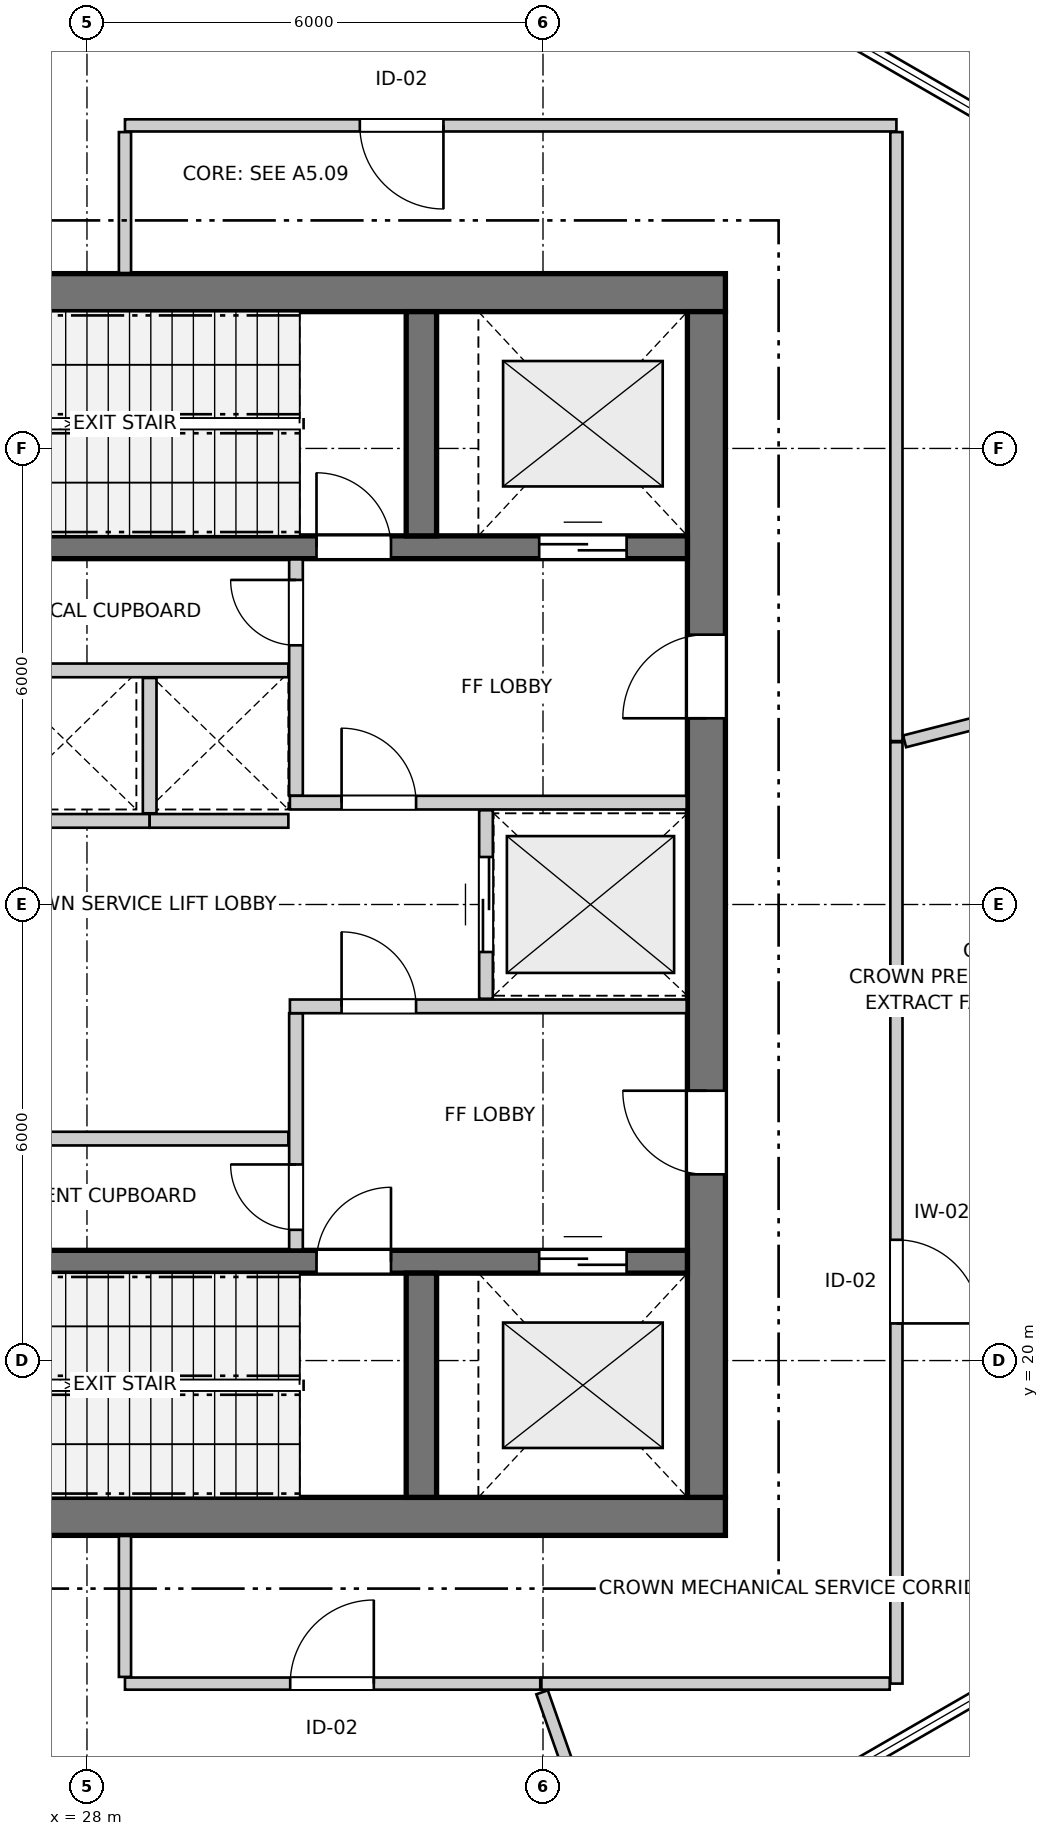
"""IFC4 building model, lengths in metres.
Left out: names, types, materials, properties, quantities, classifications, styles, units other than length and angle.
Written with IfcOpenShell. Run it as: python <this file> out.ifc"""

import sys

from ifc_helpers import new_model, si_unit, direction, frame, frame_2d, origin, place, context, subcontext, project, spatial, rectangle, extrude, source, transform, mapped, element, fill, save


model = new_model("IFC4")
c1 = context("Model", 3, precision=1e-05, world=origin(), true_north=direction((0.0, 1.0)))
c2 = subcontext(c1, "Body", "Model", "MODEL_VIEW")
j1 = project(units=[si_unit("LENGTHUNIT", "METRE"), si_unit("PLANEANGLEUNIT", "RADIAN")], contexts=[c1])
p1 = place(None, origin())
s1 = spatial("IfcSite", under=j1, at=p1, CompositionType="ELEMENT")
p2 = place(p1, origin())
s2 = spatial("IfcBuilding", under=s1, at=p2, CompositionType="ELEMENT")
p3 = place(p2, frame((0.0, 0.0, 253.2)))
s3 = spatial("IfcBuildingStorey", under=s2, at=p3, CompositionType="ELEMENT", Elevation=253.2)
for number, where, z_axis, x_axis in (
    (1, (24.3, 17.95, 0.0), (0.0, 0.0, 1.0), (1.0, 0.0, 0.0)),
    (2, (36.4, 34.05, 0.0), (0.0, 0.0, 1.0), (-1.0, 0.0, 0.0)),
):
    element("IfcWall", number, at=place(p3, frame(where, z_axis=z_axis, x_axis=x_axis)), inside=s3, PredefinedType="SHEAR", context=c2, shape_type="SweptSolid", body=[
        extrude(rectangle(XDim=12.1, YDim=0.5, at=frame_2d((6.05, 0.0))), origin(), (0.0, 0.0, 1.0), 4.05),
    ])
p4 = place(p3, frame((36.15, 18.2, 0.0), z_axis=(0.0, 0.0, 1.0), x_axis=(0.0, 1.0, 0.0)))
e3 = element("IfcWall", 3, at=p4, inside=s3, PredefinedType="SHEAR", context=c2, shape_type="SweptSolid", body=[
    extrude(rectangle(XDim=15.6, YDim=0.5, at=frame_2d((7.8, 0.0))), origin(), (0.0, 0.0, 1.0), 4.05),
])
p5 = place(p4, frame((4.25, 0.0, 0.0)))
e4 = element("IfcOpeningElement", 4, at=p5, cuts=e3, PredefinedType="OPENING", context=c2, shape_type="SweptSolid", body=[
    extrude(rectangle(XDim=1.1, YDim=2.15, at=frame_2d((0.55, 1.075))), frame((0.0, 0.26, 0.0), z_axis=(0.0, -1.0, 0.0), x_axis=(1.0, 0.0, 0.0)), (0.0, 0.0, 1.0), 0.52),
])
p6 = place(p4, frame((10.25, 0.0, 0.0)))
e5 = element("IfcOpeningElement", 5, at=p6, cuts=e3, PredefinedType="OPENING", context=c2, shape_type="SweptSolid", body=[
    extrude(rectangle(XDim=1.1, YDim=2.15, at=frame_2d((0.55, 1.075))), frame((0.0, 0.26, 0.0), z_axis=(0.0, -1.0, 0.0), x_axis=(1.0, 0.0, 0.0)), (0.0, 0.0, 1.0), 0.52),
])
p7 = place(p3, frame((24.8, 21.3, 0.0), z_axis=(0.0, 0.0, 1.0), x_axis=(1.0, 0.0, 0.0)))
e6 = element("IfcWall", 6, at=p7, inside=s3, PredefinedType="SHEAR", context=c2, shape_type="SweptSolid", body=[
    extrude(rectangle(XDim=11.1, YDim=0.3, at=frame_2d((5.55, 0.0))), origin(), (0.0, 0.0, 1.0), 4.05),
])
p8 = place(p7, frame((6.22, 0.0, 0.0)))
e7 = element("IfcOpeningElement", 7, at=p8, cuts=e6, PredefinedType="OPENING", context=c2, shape_type="SweptSolid", body=[
    extrude(rectangle(XDim=0.98, YDim=2.15, at=frame_2d((0.49, 1.075))), frame((0.0, 0.16, 0.0), z_axis=(0.0, -1.0, 0.0), x_axis=(1.0, 0.0, 0.0)), (0.0, 0.0, 1.0), 0.32),
])
p9 = place(p7, frame((9.15, 0.0, 0.0)))
e8 = element("IfcOpeningElement", 8, at=p9, cuts=e6, PredefinedType="OPENING", context=c2, shape_type="SweptSolid", body=[
    extrude(rectangle(XDim=1.15, YDim=2.15, at=frame_2d((0.575, 1.075))), frame((0.0, 0.16, 0.0), z_axis=(0.0, -1.0, 0.0), x_axis=(1.0, 0.0, 0.0)), (0.0, 0.0, 1.0), 0.32),
])
p10 = place(p3, frame((32.4, 18.2, 0.0), z_axis=(0.0, 0.0, 1.0), x_axis=(0.0, 1.0, 0.0)))
e9 = element("IfcWall", 9, at=p10, inside=s3, PredefinedType="SHEAR", context=c2, shape_type="SweptSolid", body=[
    extrude(rectangle(XDim=2.95, YDim=0.4, at=frame_2d((1.475, 0.0))), origin(), (0.0, 0.0, 1.0), 4.05),
])
p11 = place(p3, frame((24.8, 30.7, 0.0), z_axis=(0.0, 0.0, 1.0), x_axis=(1.0, 0.0, 0.0)))
e10 = element("IfcWall", 10, at=p11, inside=s3, PredefinedType="SHEAR", context=c2, shape_type="SweptSolid", body=[
    extrude(rectangle(XDim=11.1, YDim=0.3, at=frame_2d((5.55, 0.0))), origin(), (0.0, 0.0, 1.0), 4.05),
])
p12 = place(p11, frame((6.22, 0.0, 0.0)))
e11 = element("IfcOpeningElement", 11, at=p12, cuts=e10, PredefinedType="OPENING", context=c2, shape_type="SweptSolid", body=[
    extrude(rectangle(XDim=0.98, YDim=2.15, at=frame_2d((0.49, 1.075))), frame((0.0, 0.16, 0.0), z_axis=(0.0, -1.0, 0.0), x_axis=(1.0, 0.0, 0.0)), (0.0, 0.0, 1.0), 0.32),
])
p13 = place(p11, frame((9.15, 0.0, 0.0)))
e12 = element("IfcOpeningElement", 12, at=p13, cuts=e10, PredefinedType="OPENING", context=c2, shape_type="SweptSolid", body=[
    extrude(rectangle(XDim=1.15, YDim=2.15, at=frame_2d((0.575, 1.075))), frame((0.0, 0.16, 0.0), z_axis=(0.0, -1.0, 0.0), x_axis=(1.0, 0.0, 0.0)), (0.0, 0.0, 1.0), 0.32),
])
p14 = place(p3, frame((32.4, 30.85, 0.0), z_axis=(0.0, 0.0, 1.0), x_axis=(0.0, 1.0, 0.0)))
e13 = element("IfcWall", 13, at=p14, inside=s3, PredefinedType="SHEAR", context=c2, shape_type="SweptSolid", body=[
    extrude(rectangle(XDim=2.95, YDim=0.4, at=frame_2d((1.475, 0.0))), origin(), (0.0, 0.0, 1.0), 4.05),
])
p15 = place(p3, frame((30.75, 21.46, 0.0), z_axis=(0.0, 0.0, 1.0), x_axis=(0.0, 1.0, 0.0)))
e14 = element("IfcWall", 14, at=p15, inside=s3, PredefinedType="PARTITIONING", context=c2, shape_type="SweptSolid", body=[
    extrude(rectangle(XDim=3.11, YDim=0.18, at=frame_2d((1.555, 0.0))), origin(), (0.0, 0.0, 1.0), 4.05),
])
p16 = place(p15, frame((0.26, 0.0, 0.0)))
e15 = element("IfcOpeningElement", 15, at=p16, cuts=e14, PredefinedType="OPENING", context=c2, shape_type="SweptSolid", body=[
    extrude(rectangle(XDim=0.86, YDim=2.05, at=frame_2d((0.43, 1.025))), frame((0.0, 0.1, 0.0), z_axis=(0.0, -1.0, 0.0), x_axis=(1.0, 0.0, 0.0)), (0.0, 0.0, 1.0), 0.2),
])
p17 = place(p3, frame((30.67, 24.66, 0.0), z_axis=(0.0, 0.0, 1.0), x_axis=(1.0, 0.0, 0.0)))
e16 = element("IfcWall", 16, at=p17, inside=s3, PredefinedType="PARTITIONING", context=c2, shape_type="SweptSolid", body=[
    extrude(rectangle(XDim=5.22, YDim=0.18, at=frame_2d((2.61, 0.0))), origin(), (0.0, 0.0, 1.0), 4.05),
])
p18 = place(p17, frame((0.68, 0.0, 0.0)))
e17 = element("IfcOpeningElement", 17, at=p18, cuts=e16, PredefinedType="OPENING", context=c2, shape_type="SweptSolid", body=[
    extrude(rectangle(XDim=0.98, YDim=2.15, at=frame_2d((0.49, 1.075))), frame((0.0, 0.1, 0.0), z_axis=(0.0, -1.0, 0.0), x_axis=(1.0, 0.0, 0.0)), (0.0, 0.0, 1.0), 0.2),
])
p19 = place(p3, frame((30.75, 27.43, 0.0), z_axis=(0.0, 0.0, 1.0), x_axis=(0.0, 1.0, 0.0)))
e18 = element("IfcWall", 18, at=p19, inside=s3, PredefinedType="PARTITIONING", context=c2, shape_type="SweptSolid", body=[
    extrude(rectangle(XDim=3.11, YDim=0.18, at=frame_2d((1.555, 0.0))), origin(), (0.0, 0.0, 1.0), 4.05),
])
p20 = place(p19, frame((1.98, 0.0, 0.0)))
e19 = element("IfcOpeningElement", 19, at=p20, cuts=e18, PredefinedType="OPENING", context=c2, shape_type="SweptSolid", body=[
    extrude(rectangle(XDim=0.86, YDim=2.05, at=frame_2d((0.43, 1.025))), frame((0.0, 0.1, 0.0), z_axis=(0.0, -1.0, 0.0), x_axis=(1.0, 0.0, 0.0)), (0.0, 0.0, 1.0), 0.2),
])
p21 = place(p3, frame((30.67, 27.34, 0.0), z_axis=(0.0, 0.0, 1.0), x_axis=(1.0, 0.0, 0.0)))
e20 = element("IfcWall", 20, at=p21, inside=s3, PredefinedType="PARTITIONING", context=c2, shape_type="SweptSolid", body=[
    extrude(rectangle(XDim=5.22, YDim=0.18, at=frame_2d((2.61, 0.0))), origin(), (0.0, 0.0, 1.0), 4.05),
])
p22 = place(p21, frame((0.68, 0.0, 0.0)))
e21 = element("IfcOpeningElement", 21, at=p22, cuts=e20, PredefinedType="OPENING", context=c2, shape_type="SweptSolid", body=[
    extrude(rectangle(XDim=0.98, YDim=2.15, at=frame_2d((0.49, 1.075))), frame((0.0, 0.1, 0.0), z_axis=(0.0, -1.0, 0.0), x_axis=(1.0, 0.0, 0.0)), (0.0, 0.0, 1.0), 0.2),
])
p23 = place(p3, frame((33.25, 24.76, 0.0), z_axis=(0.0, 0.0, 1.0), x_axis=(0.0, 1.0, 0.0)))
e22 = element("IfcWall", 22, at=p23, inside=s3, PredefinedType="PARTITIONING", context=c2, shape_type="SweptSolid", body=[
    extrude(rectangle(XDim=2.48, YDim=0.18, at=frame_2d((1.24, 0.0))), origin(), (0.0, 0.0, 1.0), 4.05),
])
p24 = place(p23, frame((0.615, 0.0, 0.0)))
e23 = element("IfcOpeningElement", 23, at=p24, cuts=e22, PredefinedType="OPENING", context=c2, shape_type="SweptSolid", body=[
    extrude(rectangle(XDim=1.25, YDim=2.15, at=frame_2d((0.625, 1.075))), frame((0.0, 0.1, 0.0), z_axis=(0.0, -1.0, 0.0), x_axis=(1.0, 0.0, 0.0)), (0.0, 0.0, 1.0), 0.2),
])
for number, where, z_axis, x_axis in (
    (24, (24.81, 22.92, 0.0), (0.0, 0.0, 1.0), (1.0, 0.0, 0.0)),
    (25, (24.81, 29.08, 0.0), (0.0, 0.0, 1.0), (1.0, 0.0, 0.0)),
):
    element("IfcWall", number, at=place(p3, frame(where, z_axis=z_axis, x_axis=x_axis)), inside=s3, PredefinedType="PARTITIONING", context=c2, shape_type="SweptSolid", body=[
        extrude(rectangle(XDim=5.84, YDim=0.18, at=frame_2d((2.92, 0.0))), origin(), (0.0, 0.0, 1.0), 4.05),
    ])
p25 = place(p3, frame((26.775, 27.1, 0.0), z_axis=(0.0, 0.0, 1.0), x_axis=(1.0, 0.0, 0.0)))
e26 = element("IfcWall", 26, at=p25, inside=s3, PredefinedType="PARTITIONING", context=c2, shape_type="SweptSolid", body=[
    extrude(rectangle(XDim=2.05, YDim=0.18, at=frame_2d((1.025, 0.0))), origin(), (0.0, 0.0, 1.0), 4.05),
])
p26 = place(p3, frame((28.825, 27.1, 0.0), z_axis=(0.0, 0.0, 1.0), x_axis=(1.0, 0.0, 0.0)))
e27 = element("IfcWall", 27, at=p26, inside=s3, PredefinedType="PARTITIONING", context=c2, shape_type="SweptSolid", body=[
    extrude(rectangle(XDim=1.825, YDim=0.18, at=frame_2d((0.913, 0.0))), origin(), (0.0, 0.0, 1.0), 4.05),
])
p27 = place(p3, frame((28.825, 27.2, 0.0), z_axis=(0.0, 0.0, 1.0), x_axis=(0.0, 1.0, 0.0)))
e28 = element("IfcWall", 28, at=p27, inside=s3, PredefinedType="PARTITIONING", context=c2, shape_type="SweptSolid", body=[
    extrude(rectangle(XDim=1.78, YDim=0.18, at=frame_2d((0.89, 0.0))), origin(), (0.0, 0.0, 1.0), 4.05),
])
p28 = place(p3, frame((38.65, 28.135, 0.0), z_axis=(0.0, 0.0, 1.0), x_axis=(0.0, -1.0, 0.0)))
e29 = element("IfcWall", 29, at=p28, inside=s3, PredefinedType="PARTITIONING", context=c2, shape_type="SweptSolid", body=[
    extrude(rectangle(XDim=12.385, YDim=0.16, at=frame_2d((6.192, 0.0))), origin(), (0.0, 0.0, 1.0), 4.05),
])
p29 = place(p28, frame((6.546, 0.0, 0.0)))
e30 = element("IfcOpeningElement", 30, at=p29, cuts=e29, PredefinedType="OPENING", context=c2, shape_type="SweptSolid", body=[
    extrude(rectangle(XDim=1.1, YDim=2.15, at=frame_2d((0.55, 1.075))), frame((0.0, 0.09, 0.0), z_axis=(0.0, -1.0, 0.0), x_axis=(1.0, 0.0, 0.0)), (0.0, 0.0, 1.0), 0.18),
])
p30 = place(p3, frame((38.65, 36.25, 0.0), z_axis=(0.0, 0.0, 1.0), x_axis=(-1.0, 0.0, 0.0)))
e31 = element("IfcWall", 31, at=p30, inside=s3, PredefinedType="PARTITIONING", context=c2, shape_type="SweptSolid", body=[
    extrude(rectangle(XDim=10.15, YDim=0.16, at=frame_2d((5.075, 0.0))), origin(), (0.0, 0.0, 1.0), 4.05),
])
p31 = place(p30, frame((5.96, 0.0, 0.0)))
e32 = element("IfcOpeningElement", 32, at=p31, cuts=e31, PredefinedType="OPENING", context=c2, shape_type="SweptSolid", body=[
    extrude(rectangle(XDim=1.1, YDim=2.15, at=frame_2d((0.55, 1.075))), frame((0.0, 0.09, 0.0), z_axis=(0.0, -1.0, 0.0), x_axis=(1.0, 0.0, 0.0)), (0.0, 0.0, 1.0), 0.18),
])
p32 = place(p3, frame((28.5, 15.75, 0.0), z_axis=(0.0, 0.0, 1.0), x_axis=(1.0, 0.0, 0.0)))
e33 = element("IfcWall", 33, at=p32, inside=s3, PredefinedType="PARTITIONING", context=c2, shape_type="SweptSolid", body=[
    extrude(rectangle(XDim=5.464, YDim=0.16, at=frame_2d((2.732, 0.0))), origin(), (0.0, 0.0, 1.0), 4.05),
])
p33 = place(p32, frame((2.174, 0.0, 0.0)))
e34 = element("IfcOpeningElement", 34, at=p33, cuts=e33, PredefinedType="OPENING", context=c2, shape_type="SweptSolid", body=[
    extrude(rectangle(XDim=1.1, YDim=2.15, at=frame_2d((0.55, 1.075))), frame((0.0, 0.09, 0.0), z_axis=(0.0, -1.0, 0.0), x_axis=(1.0, 0.0, 0.0)), (0.0, 0.0, 1.0), 0.18),
])
p34 = place(p3, frame((38.65, 28.15, 0.0), z_axis=(0.0, 0.0, 1.0), x_axis=(0.0, 1.0, 0.0)))
e35 = element("IfcWall", 35, at=p34, inside=s3, PredefinedType="PARTITIONING", context=c2, shape_type="SweptSolid", body=[
    extrude(rectangle(XDim=8.012, YDim=0.16, at=frame_2d((4.006, 0.0))), origin(), (0.0, 0.0, 1.0), 4.05),
])
p35 = place(p3, frame((33.979, 15.75, 0.0), z_axis=(0.0, 0.0, 1.0), x_axis=(1.0, 0.0, 0.0)))
e36 = element("IfcWall", 36, at=p35, inside=s3, PredefinedType="PARTITIONING", context=c2, shape_type="SweptSolid", body=[
    extrude(rectangle(XDim=4.583, YDim=0.16, at=frame_2d((2.292, 0.0))), origin(), (0.0, 0.0, 1.0), 4.05),
])
p36 = place(p3, frame((33.988, 15.636, 0.0), z_axis=(0.0, 0.0, 1.0), x_axis=(0.331475994505, -0.943463653283, 0.0)))
e37 = element("IfcWall", 37, at=p36, inside=s3, PredefinedType="PARTITIONING", context=c2, shape_type="SweptSolid", body=[
    extrude(rectangle(XDim=2.937, YDim=0.16, at=frame_2d((1.468, 0.0))), origin(), (0.0, 0.0, 1.0), 4.05),
])
p37 = place(p3, frame((38.758, 28.146, 0.0), z_axis=(0.0, 0.0, 1.0), x_axis=(0.968866064002, 0.247585439849, 0.0)))
e38 = element("IfcWall", 38, at=p37, inside=s3, PredefinedType="PARTITIONING", context=c2, shape_type="SweptSolid", body=[
    extrude(rectangle(XDim=2.581, YDim=0.16, at=frame_2d((1.29, 0.0))), origin(), (0.0, 0.0, 1.0), 4.05),
])
for number, where, z_axis, x_axis in (
    (39, (28.5, 34.308, 0.0), (0.0, 0.0, 1.0), (0.0, 1.0, 0.0)),
    (40, (28.5, 15.838, 0.0), (0.0, 0.0, 1.0), (0.0, 1.0, 0.0)),
):
    element("IfcWall", number, at=place(p3, frame(where, z_axis=z_axis, x_axis=x_axis)), inside=s3, PredefinedType="PARTITIONING", context=c2, shape_type="SweptSolid", body=[
        extrude(rectangle(XDim=1.854, YDim=0.16, at=frame_2d((0.927, 0.0))), origin(), (0.0, 0.0, 1.0), 4.05),
    ])
m1 = source(origin(), c2, "Body", "SweptSolid", [
    extrude(rectangle(XDim=0.98, YDim=2.15, at=frame_2d((0.49, 1.075))), frame((0.0, 0.025, 0.0), z_axis=(0.0, -1.0, 0.0), x_axis=(1.0, 0.0, 0.0)), (0.0, 0.0, 1.0), 0.05),
])
p38 = place(p8, origin())
e41 = element("IfcDoor", 41, at=p38, inside=s3, OperationType="SINGLE_SWING_RIGHT", PredefinedType="DOOR", context=c2, shape_type="MappedRepresentation", body=[
    mapped(m1, transform((0.0, 0.0, 0.0), x_axis=(1.0, 0.0, 0.0), y_axis=(0.0, 1.0, 0.0), z_axis=(0.0, 0.0, 1.0), scale=1.0)),
])
fill(e7, e41)
m2 = source(origin(), c2, "Body", "SweptSolid", [
    extrude(rectangle(XDim=1.15, YDim=2.15, at=frame_2d((0.575, 1.075))), frame((0.0, 0.025, 0.0), z_axis=(0.0, -1.0, 0.0), x_axis=(1.0, 0.0, 0.0)), (0.0, 0.0, 1.0), 0.05),
])
p39 = place(p9, origin())
e42 = element("IfcDoor", 42, at=p39, inside=s3, OperationType="DOUBLE_DOOR_SLIDING", PredefinedType="DOOR", context=c2, shape_type="MappedRepresentation", body=[
    mapped(m2, transform((0.0, 0.0, 0.0), x_axis=(1.0, 0.0, 0.0), y_axis=(0.0, 1.0, 0.0), z_axis=(0.0, 0.0, 1.0), scale=1.0)),
])
fill(e8, e42)
p40 = place(p12, origin())
e43 = element("IfcDoor", 43, at=p40, inside=s3, OperationType="SINGLE_SWING_LEFT", PredefinedType="DOOR", context=c2, shape_type="MappedRepresentation", body=[
    mapped(m1, transform((0.0, 0.0, 0.0), x_axis=(1.0, 0.0, 0.0), y_axis=(0.0, 1.0, 0.0), z_axis=(0.0, 0.0, 1.0), scale=1.0)),
])
fill(e11, e43)
p41 = place(p13, origin())
e44 = element("IfcDoor", 44, at=p41, inside=s3, OperationType="DOUBLE_DOOR_SLIDING", PredefinedType="DOOR", context=c2, shape_type="MappedRepresentation", body=[
    mapped(m2, transform((0.0, 0.0, 0.0), x_axis=(1.0, 0.0, 0.0), y_axis=(0.0, 1.0, 0.0), z_axis=(0.0, 0.0, 1.0), scale=1.0)),
])
fill(e12, e44)
m3 = source(origin(), c2, "Body", "SweptSolid", [
    extrude(rectangle(XDim=1.1, YDim=2.15, at=frame_2d((0.55, 1.075))), frame((0.0, 0.025, 0.0), z_axis=(0.0, -1.0, 0.0), x_axis=(1.0, 0.0, 0.0)), (0.0, 0.0, 1.0), 0.05),
])
p42 = place(p5, origin())
e45 = element("IfcDoor", 45, at=p42, inside=s3, OperationType="SINGLE_SWING_RIGHT", PredefinedType="DOOR", context=c2, shape_type="MappedRepresentation", body=[
    mapped(m3, transform((0.0, 0.0, 0.0), x_axis=(1.0, 0.0, 0.0), y_axis=(0.0, 1.0, 0.0), z_axis=(0.0, 0.0, 1.0), scale=1.0)),
])
fill(e4, e45)
p43 = place(p6, origin())
e46 = element("IfcDoor", 46, at=p43, inside=s3, OperationType="SINGLE_SWING_LEFT", PredefinedType="DOOR", context=c2, shape_type="MappedRepresentation", body=[
    mapped(m3, transform((0.0, 0.0, 0.0), x_axis=(1.0, 0.0, 0.0), y_axis=(0.0, 1.0, 0.0), z_axis=(0.0, 0.0, 1.0), scale=1.0)),
])
fill(e5, e46)
m4 = source(origin(), c2, "Body", "SweptSolid", [
    extrude(rectangle(XDim=0.86, YDim=2.05, at=frame_2d((0.43, 1.025))), frame((0.0, 0.025, 0.0), z_axis=(0.0, -1.0, 0.0), x_axis=(1.0, 0.0, 0.0)), (0.0, 0.0, 1.0), 0.05),
])
p44 = place(p16, origin())
e47 = element("IfcDoor", 47, at=p44, inside=s3, OperationType="SINGLE_SWING_RIGHT", PredefinedType="DOOR", context=c2, shape_type="MappedRepresentation", body=[
    mapped(m4, transform((0.0, 0.0, 0.0), x_axis=(1.0, 0.0, 0.0), y_axis=(0.0, 1.0, 0.0), z_axis=(0.0, 0.0, 1.0), scale=1.0)),
])
fill(e15, e47)
p45 = place(p18, origin())
e48 = element("IfcDoor", 48, at=p45, inside=s3, OperationType="SINGLE_SWING_LEFT", PredefinedType="DOOR", context=c2, shape_type="MappedRepresentation", body=[
    mapped(m1, transform((0.0, 0.0, 0.0), x_axis=(1.0, 0.0, 0.0), y_axis=(0.0, 1.0, 0.0), z_axis=(0.0, 0.0, 1.0), scale=1.0)),
])
fill(e17, e48)
p46 = place(p20, origin())
e49 = element("IfcDoor", 49, at=p46, inside=s3, OperationType="SINGLE_SWING_RIGHT", PredefinedType="DOOR", context=c2, shape_type="MappedRepresentation", body=[
    mapped(m4, transform((0.0, 0.0, 0.0), x_axis=(1.0, 0.0, 0.0), y_axis=(0.0, 1.0, 0.0), z_axis=(0.0, 0.0, 1.0), scale=1.0)),
])
fill(e19, e49)
p47 = place(p22, origin())
e50 = element("IfcDoor", 50, at=p47, inside=s3, OperationType="SINGLE_SWING_LEFT", PredefinedType="DOOR", context=c2, shape_type="MappedRepresentation", body=[
    mapped(m1, transform((0.0, 0.0, 0.0), x_axis=(1.0, 0.0, 0.0), y_axis=(0.0, 1.0, 0.0), z_axis=(0.0, 0.0, 1.0), scale=1.0)),
])
fill(e21, e50)
m5 = source(origin(), c2, "Body", "SweptSolid", [
    extrude(rectangle(XDim=1.25, YDim=2.15, at=frame_2d((0.625, 1.075))), frame((0.0, 0.025, 0.0), z_axis=(0.0, -1.0, 0.0), x_axis=(1.0, 0.0, 0.0)), (0.0, 0.0, 1.0), 0.05),
])
p48 = place(p24, origin())
e51 = element("IfcDoor", 51, at=p48, inside=s3, OperationType="DOUBLE_DOOR_SLIDING", PredefinedType="DOOR", context=c2, shape_type="MappedRepresentation", body=[
    mapped(m5, transform((0.0, 0.0, 0.0), x_axis=(1.0, 0.0, 0.0), y_axis=(0.0, 1.0, 0.0), z_axis=(0.0, 0.0, 1.0), scale=1.0)),
])
fill(e23, e51)
p49 = place(p29, origin())
e52 = element("IfcDoor", 52, at=p49, inside=s3, OperationType="SINGLE_SWING_RIGHT", PredefinedType="DOOR", context=c2, shape_type="MappedRepresentation", body=[
    mapped(m3, transform((0.0, 0.0, 0.0), x_axis=(1.0, 0.0, 0.0), y_axis=(0.0, 1.0, 0.0), z_axis=(0.0, 0.0, 1.0), scale=1.0)),
])
fill(e30, e52)
p50 = place(p31, origin())
e53 = element("IfcDoor", 53, at=p50, inside=s3, OperationType="SINGLE_SWING_LEFT", PredefinedType="DOOR", context=c2, shape_type="MappedRepresentation", body=[
    mapped(m3, transform((0.0, 0.0, 0.0), x_axis=(1.0, 0.0, 0.0), y_axis=(0.0, 1.0, 0.0), z_axis=(0.0, 0.0, 1.0), scale=1.0)),
])
fill(e32, e53)
p51 = place(p33, origin())
e54 = element("IfcDoor", 54, at=p51, inside=s3, OperationType="SINGLE_SWING_RIGHT", PredefinedType="DOOR", context=c2, shape_type="MappedRepresentation", body=[
    mapped(m3, transform((0.0, 0.0, 0.0), x_axis=(1.0, 0.0, 0.0), y_axis=(0.0, 1.0, 0.0), z_axis=(0.0, 0.0, 1.0), scale=1.0)),
])
fill(e34, e54)
save(model, sys.argv[1])
